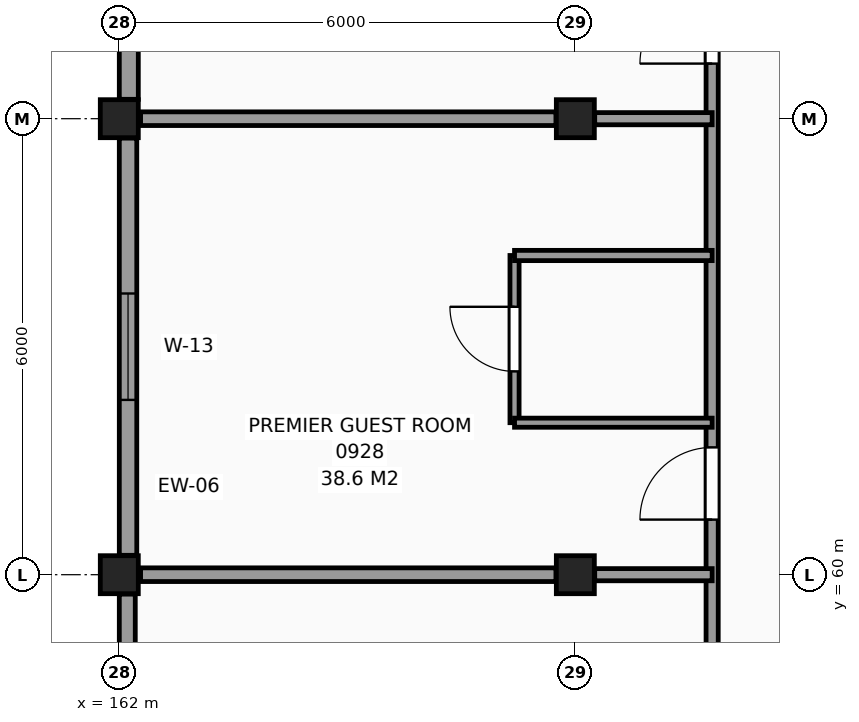
"""IFC4 building model, lengths in metres.
Left out: names, types, materials, properties, quantities, classifications, styles, units other than length and angle.
Written with IfcOpenShell. Run it as: python <this file> out.ifc"""

import sys

from ifc_helpers import new_model, si_unit, direction, frame, frame_2d, origin, origin_2d, place, context, subcontext, project, spatial, rectangle, extrude, element, fill, save


model = new_model("IFC4")
c1 = context("Model", 3, precision=1e-05, world=origin(), true_north=direction((0.0, 1.0)))
c2 = subcontext(c1, "Body", "Model", "MODEL_VIEW")
j1 = project(units=[si_unit("LENGTHUNIT", "METRE"), si_unit("PLANEANGLEUNIT", "RADIAN")], contexts=[c1])
p1 = place(None, origin())
s1 = spatial("IfcSite", under=j1, at=p1, CompositionType="ELEMENT")
p2 = place(p1, origin())
s2 = spatial("IfcBuilding", under=s1, at=p2, CompositionType="ELEMENT")
p3 = place(p2, frame((0.0, 0.0, 38.1)))
s3 = spatial("IfcBuildingStorey", under=s2, at=p3, CompositionType="ELEMENT", Elevation=38.1)
for number, where, z_axis, x_axis in (
    (1, (162.0, 60.0, 0.0), (0.0, 0.0, 1.0), (1.0, 0.0, 0.0)),
    (2, (162.0, 66.0, 0.0), (0.0, 0.0, 1.0), (1.0, 0.0, 0.0)),
    (3, (168.0, 60.0, 0.0), (0.0, 0.0, 1.0), (1.0, 0.0, 0.0)),
    (4, (168.0, 66.0, 0.0), (0.0, 0.0, 1.0), (1.0, 0.0, 0.0)),
):
    element("IfcColumn", number, at=place(p3, frame(where, z_axis=z_axis, x_axis=x_axis)), inside=s3, PredefinedType="COLUMN", context=c2, shape_type="SweptSolid", body=[
        extrude(rectangle(XDim=0.5, YDim=0.5, at=origin_2d()), origin(), (0.0, 0.0, 1.0), 3.3),
    ])
p4 = place(p3, frame((162.125, 71.745, 0.0), z_axis=(0.0, 0.0, 1.0), x_axis=(0.0, -1.0, 0.0)))
e5 = element("IfcWall", 5, at=p4, inside=s3, PredefinedType="SOLIDWALL", context=c2, shape_type="SweptSolid", body=[
    extrude(rectangle(XDim=5.49, YDim=0.25, at=frame_2d((2.745, 0.0))), origin(), (0.0, 0.0, 1.0), 2.41),
])
p5 = place(p4, frame((2.045, 0.0, 0.8)))
e6 = element("IfcOpeningElement", 6, at=p5, cuts=e5, PredefinedType="OPENING", context=c2, shape_type="SweptSolid", body=[
    extrude(rectangle(XDim=1.4, YDim=1.4, at=frame_2d((0.7, 0.7))), frame((0.0, 0.135, 0.0), z_axis=(0.0, -1.0, 0.0), x_axis=(1.0, 0.0, 0.0)), (0.0, 0.0, 1.0), 0.27),
])
p6 = place(p3, frame((162.115, 65.745, 0.0), z_axis=(0.0, 0.0, 1.0), x_axis=(0.0, -1.0, 0.0)))
e7 = element("IfcWall", 7, at=p6, inside=s3, PredefinedType="SOLIDWALL", context=c2, shape_type="SweptSolid", body=[
    extrude(rectangle(XDim=5.49, YDim=0.23, at=frame_2d((2.745, 0.0))), origin(), (0.0, 0.0, 1.0), 2.41),
])
p7 = place(p6, frame((2.045, 0.0, 0.8)))
e8 = element("IfcOpeningElement", 8, at=p7, cuts=e7, PredefinedType="OPENING", context=c2, shape_type="SweptSolid", body=[
    extrude(rectangle(XDim=1.4, YDim=1.4, at=frame_2d((0.7, 0.7))), frame((0.0, 0.125, 0.0), z_axis=(0.0, -1.0, 0.0), x_axis=(1.0, 0.0, 0.0)), (0.0, 0.0, 1.0), 0.25),
])
p8 = place(p3, frame((162.105, 59.745, 0.0), z_axis=(0.0, 0.0, 1.0), x_axis=(0.0, -1.0, 0.0)))
e9 = element("IfcWall", 9, at=p8, inside=s3, PredefinedType="SOLIDWALL", context=c2, shape_type="SweptSolid", body=[
    extrude(rectangle(XDim=5.49, YDim=0.21, at=frame_2d((2.745, 0.0))), origin(), (0.0, 0.0, 1.0), 2.41),
])
p9 = place(p8, frame((2.045, 0.0, 0.8)))
e10 = element("IfcOpeningElement", 10, at=p9, cuts=e9, PredefinedType="OPENING", context=c2, shape_type="SweptSolid", body=[
    extrude(rectangle(XDim=1.4, YDim=1.4, at=frame_2d((0.7, 0.7))), frame((0.0, 0.115, 0.0), z_axis=(0.0, -1.0, 0.0), x_axis=(1.0, 0.0, 0.0)), (0.0, 0.0, 1.0), 0.23),
])
p10 = place(p3, frame((167.2, 62.0, 0.0), z_axis=(0.0, 0.0, 1.0), x_axis=(0.0, 1.0, 0.0)))
e11 = element("IfcWall", 11, at=p10, inside=s3, PredefinedType="PARTITIONING", context=c2, shape_type="SweptSolid", body=[
    extrude(rectangle(XDim=2.2, YDim=0.12, at=frame_2d((1.1, 0.0))), origin(), (0.0, 0.0, 1.0), 3.06),
])
p11 = place(p10, frame((0.675, 0.0, 0.0)))
e12 = element("IfcOpeningElement", 12, at=p11, cuts=e11, PredefinedType="OPENING", context=c2, shape_type="SweptSolid", body=[
    extrude(rectangle(XDim=0.85, YDim=2.1, at=frame_2d((0.425, 1.05))), frame((0.0, 0.07, 0.0), z_axis=(0.0, -1.0, 0.0), x_axis=(1.0, 0.0, 0.0)), (0.0, 0.0, 1.0), 0.14),
])
p12 = place(p3, frame((169.8, 42.215, 0.0), z_axis=(0.0, 0.0, 1.0), x_axis=(0.0, 1.0, 0.0)))
e13 = element("IfcWall", 13, at=p12, inside=s3, PredefinedType="PARTITIONING", context=c2, shape_type="SweptSolid", body=[
    extrude(rectangle(XDim=65.605, YDim=0.16, at=frame_2d((32.802, 0.0))), origin(), (0.0, 0.0, 1.0), 3.06),
])
p13 = place(p12, frame((50.185, 0.0, 0.0)))
e14 = element("IfcOpeningElement", 14, at=p13, cuts=e13, PredefinedType="OPENING", context=c2, shape_type="SweptSolid", body=[
    extrude(rectangle(XDim=1.2, YDim=2.2, at=frame_2d((0.6, 1.1))), frame((0.0, 0.09, 0.0), z_axis=(0.0, -1.0, 0.0), x_axis=(1.0, 0.0, 0.0)), (0.0, 0.0, 1.0), 0.18),
])
p14 = place(p12, frame((32.285, 0.0, 0.0)))
e15 = element("IfcOpeningElement", 15, at=p14, cuts=e13, PredefinedType="OPENING", context=c2, shape_type="SweptSolid", body=[
    extrude(rectangle(XDim=1.0, YDim=2.15, at=frame_2d((0.5, 1.075))), frame((0.0, 0.09, 0.0), z_axis=(0.0, -1.0, 0.0), x_axis=(1.0, 0.0, 0.0)), (0.0, 0.0, 1.0), 0.18),
])
p15 = place(p12, frame((0.46, 0.0, 0.0)))
e16 = element("IfcOpeningElement", 16, at=p15, cuts=e13, PredefinedType="OPENING", context=c2, shape_type="SweptSolid", body=[
    extrude(rectangle(XDim=0.95, YDim=2.1, at=frame_2d((0.475, 1.05))), frame((0.0, 0.09, 0.0), z_axis=(0.0, -1.0, 0.0), x_axis=(1.0, 0.0, 0.0)), (0.0, 0.0, 1.0), 0.18),
])
p16 = place(p12, frame((6.51, 0.0, 0.0)))
e17 = element("IfcOpeningElement", 17, at=p16, cuts=e13, PredefinedType="OPENING", context=c2, shape_type="SweptSolid", body=[
    extrude(rectangle(XDim=0.95, YDim=2.1, at=frame_2d((0.475, 1.05))), frame((0.0, 0.09, 0.0), z_axis=(0.0, -1.0, 0.0), x_axis=(1.0, 0.0, 0.0)), (0.0, 0.0, 1.0), 0.18),
])
p17 = place(p12, frame((12.51, 0.0, 0.0)))
e18 = element("IfcOpeningElement", 18, at=p17, cuts=e13, PredefinedType="OPENING", context=c2, shape_type="SweptSolid", body=[
    extrude(rectangle(XDim=0.95, YDim=2.1, at=frame_2d((0.475, 1.05))), frame((0.0, 0.09, 0.0), z_axis=(0.0, -1.0, 0.0), x_axis=(1.0, 0.0, 0.0)), (0.0, 0.0, 1.0), 0.18),
])
p18 = place(p12, frame((18.51, 0.0, 0.0)))
e19 = element("IfcOpeningElement", 19, at=p18, cuts=e13, PredefinedType="OPENING", context=c2, shape_type="SweptSolid", body=[
    extrude(rectangle(XDim=0.95, YDim=2.1, at=frame_2d((0.475, 1.05))), frame((0.0, 0.09, 0.0), z_axis=(0.0, -1.0, 0.0), x_axis=(1.0, 0.0, 0.0)), (0.0, 0.0, 1.0), 0.18),
])
p19 = place(p12, frame((24.51, 0.0, 0.0)))
e20 = element("IfcOpeningElement", 20, at=p19, cuts=e13, PredefinedType="OPENING", context=c2, shape_type="SweptSolid", body=[
    extrude(rectangle(XDim=0.95, YDim=2.1, at=frame_2d((0.475, 1.05))), frame((0.0, 0.09, 0.0), z_axis=(0.0, -1.0, 0.0), x_axis=(1.0, 0.0, 0.0)), (0.0, 0.0, 1.0), 0.18),
])
p20 = place(p12, frame((54.51, 0.0, 0.0)))
e21 = element("IfcOpeningElement", 21, at=p20, cuts=e13, PredefinedType="OPENING", context=c2, shape_type="SweptSolid", body=[
    extrude(rectangle(XDim=0.95, YDim=2.1, at=frame_2d((0.475, 1.05))), frame((0.0, 0.09, 0.0), z_axis=(0.0, -1.0, 0.0), x_axis=(1.0, 0.0, 0.0)), (0.0, 0.0, 1.0), 0.18),
])
p21 = place(p12, frame((60.51, 0.0, 0.0)))
e22 = element("IfcOpeningElement", 22, at=p21, cuts=e13, PredefinedType="OPENING", context=c2, shape_type="SweptSolid", body=[
    extrude(rectangle(XDim=0.95, YDim=2.1, at=frame_2d((0.475, 1.05))), frame((0.0, 0.09, 0.0), z_axis=(0.0, -1.0, 0.0), x_axis=(1.0, 0.0, 0.0)), (0.0, 0.0, 1.0), 0.18),
])
p22 = place(p3, frame((162.28, 60.0, 0.0), z_axis=(0.0, 0.0, 1.0), x_axis=(1.0, 0.0, 0.0)))
e23 = element("IfcWall", 23, at=p22, inside=s3, PredefinedType="PARTITIONING", context=c2, shape_type="SweptSolid", body=[
    extrude(rectangle(XDim=5.465, YDim=0.18, at=frame_2d((2.732, 0.0))), origin(), (0.0, 0.0, 1.0), 2.26),
])
p23 = place(p3, frame((168.255, 60.0, 0.0), z_axis=(0.0, 0.0, 1.0), x_axis=(1.0, 0.0, 0.0)))
e24 = element("IfcWall", 24, at=p23, inside=s3, PredefinedType="PARTITIONING", context=c2, shape_type="SweptSolid", body=[
    extrude(rectangle(XDim=1.545, YDim=0.16, at=frame_2d((0.772, 0.0))), origin(), (0.0, 0.0, 1.0), 2.26),
])
p24 = place(p3, frame((167.2, 62.0, 0.0), z_axis=(0.0, 0.0, 1.0), x_axis=(1.0, 0.0, 0.0)))
e25 = element("IfcWall", 25, at=p24, inside=s3, PredefinedType="PARTITIONING", context=c2, shape_type="SweptSolid", body=[
    extrude(rectangle(XDim=2.6, YDim=0.12, at=frame_2d((1.3, 0.0))), origin(), (0.0, 0.0, 1.0), 3.06),
])
p25 = place(p3, frame((167.2, 64.2, 0.0), z_axis=(0.0, 0.0, 1.0), x_axis=(1.0, 0.0, 0.0)))
e26 = element("IfcWall", 26, at=p25, inside=s3, PredefinedType="PARTITIONING", context=c2, shape_type="SweptSolid", body=[
    extrude(rectangle(XDim=2.6, YDim=0.135, at=frame_2d((1.3, 0.0))), origin(), (0.0, 0.0, 1.0), 3.06),
])
p26 = place(p3, frame((162.28, 66.0, 0.0), z_axis=(0.0, 0.0, 1.0), x_axis=(1.0, 0.0, 0.0)))
e27 = element("IfcWall", 27, at=p26, inside=s3, PredefinedType="PARTITIONING", context=c2, shape_type="SweptSolid", body=[
    extrude(rectangle(XDim=5.465, YDim=0.18, at=frame_2d((2.732, 0.0))), origin(), (0.0, 0.0, 1.0), 2.26),
])
p27 = place(p3, frame((168.255, 66.0, 0.0), z_axis=(0.0, 0.0, 1.0), x_axis=(1.0, 0.0, 0.0)))
e28 = element("IfcWall", 28, at=p27, inside=s3, PredefinedType="PARTITIONING", context=c2, shape_type="SweptSolid", body=[
    extrude(rectangle(XDim=1.545, YDim=0.16, at=frame_2d((0.772, 0.0))), origin(), (0.0, 0.0, 1.0), 2.26),
])
p28 = place(p7, origin())
e29 = element("IfcWindow", 29, at=p28, inside=s3, PartitioningType="SINGLE_PANEL", PredefinedType="WINDOW", context=c2, shape_type="SweptSolid", body=[
    extrude(rectangle(XDim=1.4, YDim=1.4, at=frame_2d((0.7, 0.7))), frame((0.0, 0.03, 0.0), z_axis=(0.0, -1.0, 0.0), x_axis=(1.0, 0.0, 0.0)), (0.0, 0.0, 1.0), 0.06),
])
fill(e8, e29)
p29 = place(p11, origin())
e30 = element("IfcDoor", 30, at=p29, inside=s3, OperationType="SINGLE_SWING_RIGHT", PredefinedType="DOOR", context=c2, shape_type="SweptSolid", body=[
    extrude(rectangle(XDim=0.85, YDim=2.1, at=frame_2d((0.425, 1.05))), frame((0.0, 0.025, 0.0), z_axis=(0.0, -1.0, 0.0), x_axis=(1.0, 0.0, 0.0)), (0.0, 0.0, 1.0), 0.05),
])
fill(e12, e30)
p30 = place(p18, origin())
e31 = element("IfcDoor", 31, at=p30, inside=s3, OperationType="SINGLE_SWING_LEFT", PredefinedType="DOOR", context=c2, shape_type="SweptSolid", body=[
    extrude(rectangle(XDim=0.95, YDim=2.1, at=frame_2d((0.475, 1.05))), frame((0.0, 0.025, 0.0), z_axis=(0.0, -1.0, 0.0), x_axis=(1.0, 0.0, 0.0)), (0.0, 0.0, 1.0), 0.05),
])
fill(e19, e31)
p31 = place(p19, origin())
e32 = element("IfcDoor", 32, at=p31, inside=s3, OperationType="SINGLE_SWING_LEFT", PredefinedType="DOOR", context=c2, shape_type="SweptSolid", body=[
    extrude(rectangle(XDim=0.95, YDim=2.1, at=frame_2d((0.475, 1.05))), frame((0.0, 0.025, 0.0), z_axis=(0.0, -1.0, 0.0), x_axis=(1.0, 0.0, 0.0)), (0.0, 0.0, 1.0), 0.05),
])
fill(e20, e32)
save(model, sys.argv[1])
